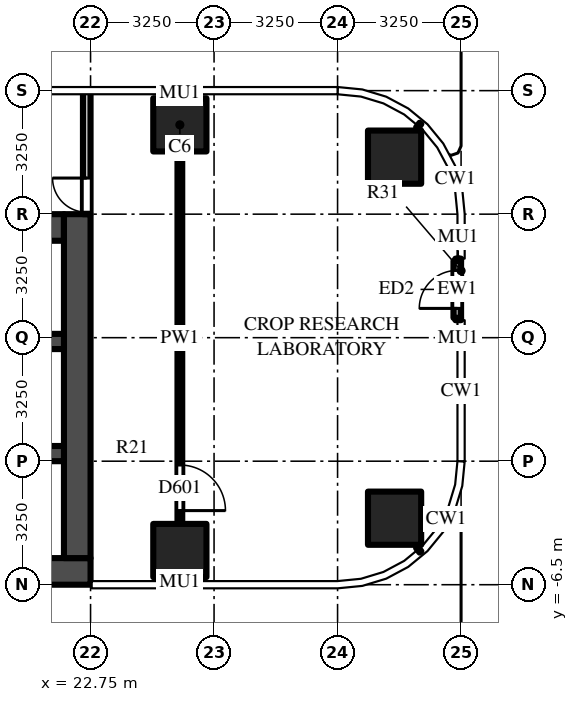
"""IFC4 building model, lengths in metres.
Left out: names, types, materials, properties, quantities, classifications, styles, units other than length and angle.
Written with IfcOpenShell. Run it as: python <this file> out.ifc"""

import sys

from ifc_helpers import new_model, si_unit, direction, frame, frame_2d, origin, origin_2d, place, context, subcontext, project, spatial, rectangle, extrude, source, transform, mapped, element, fill, save


model = new_model("IFC4")
c1 = context("Model", 3, precision=1e-05, world=origin(), true_north=direction((0.0, 1.0)))
c2 = subcontext(c1, "Body", "Model", "MODEL_VIEW")
j1 = project(units=[si_unit("LENGTHUNIT", "METRE"), si_unit("PLANEANGLEUNIT", "RADIAN")], contexts=[c1])
p1 = place(None, origin())
s1 = spatial("IfcSite", under=j1, at=p1, CompositionType="ELEMENT")
p2 = place(p1, origin())
s2 = spatial("IfcBuilding", under=s1, at=p2, CompositionType="ELEMENT")
p3 = place(p2, frame((0.0, 0.0, 34.0)))
s3 = spatial("IfcBuildingStorey", under=s2, at=p3, CompositionType="ELEMENT", Elevation=34.0)
m1 = source(origin(), c2, "Body", "SweptSolid", [
    extrude(rectangle(XDim=1.4, YDim=1.4, at=origin_2d()), origin(), (0.0, 0.0, 1.0), 4.5),
])
for number, where, z_axis, x_axis in (
    (1, (25.1, 5.6, 0.0), (0.0, 0.0, 1.0), (1.0, 0.0, 0.0)),
    (2, (30.75, 4.75, 0.0), (0.0, 0.0, 1.0), (1.0, 0.0, 0.0)),
    (3, (25.1, -5.6, 0.0), (0.0, 0.0, 1.0), (1.0, 0.0, 0.0)),
    (4, (30.75, -4.75, 0.0), (0.0, 0.0, 1.0), (1.0, 0.0, 0.0)),
):
    element("IfcColumn", number, at=place(p3, frame(where, z_axis=z_axis, x_axis=x_axis)), inside=s3, PredefinedType="COLUMN", context=c2, shape_type="MappedRepresentation", body=[
        mapped(m1, transform((0.0, 0.0, 0.0))),
    ])
m2 = source(origin(), c2, "Body", "SweptSolid", [
    extrude(rectangle(XDim=16.45, YDim=0.7, at=frame_2d((8.225, 0.0))), origin(), (0.0, 0.0, 1.0), 4.25),
])
p4 = place(p3, frame((6.3, -6.15, 0.0), z_axis=(0.0, 0.0, 1.0), x_axis=(1.0, 0.0, 0.0)))
e5 = element("IfcWall", 5, at=p4, inside=s3, PredefinedType="SHEAR", context=c2, shape_type="MappedRepresentation", body=[
    mapped(m2, transform((0.0, 0.0, 0.0))),
])
m3 = source(origin(), c2, "Body", "SweptSolid", [
    extrude(rectangle(XDim=14.85, YDim=0.7, at=frame_2d((7.425, 0.0))), origin(), (0.0, 0.0, 1.0), 4.25),
])
p5 = place(p3, frame((7.2, 2.9, 0.0), z_axis=(0.0, 0.0, 1.0), x_axis=(1.0, 0.0, 0.0)))
e6 = element("IfcWall", 6, at=p5, inside=s3, PredefinedType="SHEAR", context=c2, shape_type="MappedRepresentation", body=[
    mapped(m3, transform((0.0, 0.0, 0.0))),
])
m4 = source(origin(), c2, "Body", "SweptSolid", [
    extrude(rectangle(XDim=1.3, YDim=2.1, at=frame_2d((0.65, 1.05))), frame((0.0, 0.36, 0.0), z_axis=(0.0, -1.0, 0.0), x_axis=(1.0, 0.0, 0.0)), (0.0, 0.0, 1.0), 0.72),
])
p6 = place(p5, frame((12.2, 0.0, 0.0)))
e7 = element("IfcOpeningElement", 7, at=p6, cuts=e6, PredefinedType="OPENING", context=c2, shape_type="MappedRepresentation", body=[
    mapped(m4, transform((0.0, 0.0, 0.0))),
])
m5 = source(origin(), c2, "Body", "SweptSolid", [
    extrude(rectangle(XDim=1.2, YDim=2.1, at=frame_2d((0.6, 1.05))), frame((0.0, 0.36, 0.0), z_axis=(0.0, -1.0, 0.0), x_axis=(1.0, 0.0, 0.0)), (0.0, 0.0, 1.0), 0.72),
])
p7 = place(p5, frame((9.85, 0.0, 0.0)))
e8 = element("IfcOpeningElement", 8, at=p7, cuts=e6, PredefinedType="OPENING", context=c2, shape_type="MappedRepresentation", body=[
    mapped(m5, transform((0.0, 0.0, 0.0))),
])
m6 = source(origin(), c2, "Body", "SweptSolid", [
    extrude(rectangle(XDim=1.0, YDim=2.1, at=frame_2d((0.5, 1.05))), frame((0.0, 0.36, 0.0), z_axis=(0.0, -1.0, 0.0), x_axis=(1.0, 0.0, 0.0)), (0.0, 0.0, 1.0), 0.72),
])
p8 = place(p5, frame((7.9, 0.0, 0.0)))
e9 = element("IfcOpeningElement", 9, at=p8, cuts=e6, PredefinedType="OPENING", context=c2, shape_type="MappedRepresentation", body=[
    mapped(m6, transform((0.0, 0.0, 0.0))),
])
m7 = source(origin(), c2, "Body", "SweptSolid", [
    extrude(rectangle(XDim=0.9, YDim=2.1, at=frame_2d((0.45, 1.05))), frame((0.0, 0.36, 0.0), z_axis=(0.0, -1.0, 0.0), x_axis=(1.0, 0.0, 0.0)), (0.0, 0.0, 1.0), 0.72),
])
p9 = place(p5, frame((0.65, 0.0, 0.0)))
e10 = element("IfcOpeningElement", 10, at=p9, cuts=e6, PredefinedType="OPENING", context=c2, shape_type="MappedRepresentation", body=[
    mapped(m7, transform((0.0, 0.0, 0.0))),
])
p10 = place(p5, frame((3.25, 0.0, 0.0)))
e11 = element("IfcOpeningElement", 11, at=p10, cuts=e6, PredefinedType="OPENING", context=c2, shape_type="MappedRepresentation", body=[
    mapped(m7, transform((0.0, 0.0, 0.0))),
])
p11 = place(p5, frame((5.8, 0.0, 0.0)))
e12 = element("IfcOpeningElement", 12, at=p11, cuts=e6, PredefinedType="OPENING", context=c2, shape_type="MappedRepresentation", body=[
    mapped(m6, transform((0.0, 0.0, 0.0))),
])
m8 = source(origin(), c2, "Body", "SweptSolid", [
    extrude(rectangle(XDim=9.05, YDim=0.7, at=frame_2d((4.525, 0.0))), origin(), (0.0, 0.0, 1.0), 4.25),
])
p12 = place(p3, frame((22.4, -5.8, 0.0), z_axis=(0.0, 0.0, 1.0), x_axis=(0.0, 1.0, 0.0)))
e13 = element("IfcWall", 13, at=p12, inside=s3, PredefinedType="SHEAR", context=c2, shape_type="MappedRepresentation", body=[
    mapped(m8, transform((0.0, 0.0, 0.0))),
])
m9 = source(origin(), c2, "Body", "SweptSolid", [
    extrude(rectangle(XDim=14.85, YDim=0.4, at=frame_2d((7.425, 0.0))), origin(), (0.0, 0.0, 1.0), 4.25),
])
p13 = place(p3, frame((7.2, -0.1, 0.0), z_axis=(0.0, 0.0, 1.0), x_axis=(1.0, 0.0, 0.0)))
e14 = element("IfcWall", 14, at=p13, inside=s3, PredefinedType="SHEAR", context=c2, shape_type="MappedRepresentation", body=[
    mapped(m9, transform((0.0, 0.0, 0.0))),
])
m10 = source(origin(), c2, "Body", "SweptSolid", [
    extrude(rectangle(XDim=1.0, YDim=2.1, at=frame_2d((0.5, 1.05))), frame((0.0, 0.21, 0.0), z_axis=(0.0, -1.0, 0.0), x_axis=(1.0, 0.0, 0.0)), (0.0, 0.0, 1.0), 0.42),
])
p14 = place(p13, frame((7.9, 0.0, 0.0)))
e15 = element("IfcOpeningElement", 15, at=p14, cuts=e14, PredefinedType="OPENING", context=c2, shape_type="MappedRepresentation", body=[
    mapped(m10, transform((0.0, 0.0, 0.0))),
])
m11 = source(origin(), c2, "Body", "SweptSolid", [
    extrude(rectangle(XDim=5.7, YDim=0.4, at=frame_2d((2.85, 0.0))), origin(), (0.0, 0.0, 1.0), 4.25),
])
p15 = place(p3, frame((16.35, -3.05, 0.0), z_axis=(0.0, 0.0, 1.0), x_axis=(1.0, 0.0, 0.0)))
e16 = element("IfcWall", 16, at=p15, inside=s3, PredefinedType="SHEAR", context=c2, shape_type="MappedRepresentation", body=[
    mapped(m11, transform((0.0, 0.0, 0.0))),
])
m12 = source(origin(), c2, "Body", "SweptSolid", [
    extrude(rectangle(XDim=3.25, YDim=0.2, at=frame_2d((1.625, 0.0))), origin(), (0.0, 0.0, 1.0), 4.25),
])
p16 = place(p3, frame((22.65, 3.25, 0.0), z_axis=(0.0, 0.0, 1.0), x_axis=(0.0, 1.0, 0.0)))
e17 = element("IfcWall", 17, at=p16, inside=s3, PredefinedType="PARTITIONING", context=c2, shape_type="MappedRepresentation", body=[
    mapped(m12, transform((0.0, 0.0, 0.0))),
])
m13 = source(origin(), c2, "Body", "SweptSolid", [
    extrude(rectangle(XDim=0.9, YDim=2.1, at=frame_2d((0.45, 1.05))), frame((0.0, 0.11, 0.0), z_axis=(0.0, -1.0, 0.0), x_axis=(1.0, 0.0, 0.0)), (0.0, 0.0, 1.0), 0.22),
])
p17 = place(p16, frame((0.05, 0.0, 0.0)))
e18 = element("IfcOpeningElement", 18, at=p17, cuts=e17, PredefinedType="OPENING", context=c2, shape_type="MappedRepresentation", body=[
    mapped(m13, transform((0.0, 0.0, 0.0))),
])
m14 = source(origin(), c2, "Body", "SweptSolid", [
    extrude(rectangle(XDim=1.5, YDim=0.2, at=frame_2d((0.75, 0.0))), origin(), (0.0, 0.0, 1.0), 4.25),
])
p18 = place(p3, frame((32.4, 0.52, 0.0), z_axis=(0.0, 0.0, 1.0), x_axis=(0.0, 1.0, 0.0)))
e19 = element("IfcWall", 19, at=p18, inside=s3, PredefinedType="SOLIDWALL", context=c2, shape_type="MappedRepresentation", body=[
    mapped(m14, transform((0.0, 0.0, 0.0))),
])
m15 = source(origin(), c2, "Body", "SweptSolid", [
    extrude(rectangle(XDim=1.0, YDim=2.4, at=frame_2d((0.5, 1.2))), frame((0.0, 0.11, 0.0), z_axis=(0.0, -1.0, 0.0), x_axis=(1.0, 0.0, 0.0)), (0.0, 0.0, 1.0), 0.22),
])
p19 = place(p18, frame((0.25, 0.0, 0.0)))
e20 = element("IfcOpeningElement", 20, at=p19, cuts=e19, PredefinedType="OPENING", context=c2, shape_type="MappedRepresentation", body=[
    mapped(m15, transform((0.0, 0.0, 0.0))),
])
m16 = source(origin(), c2, "Body", "SweptSolid", [
    extrude(rectangle(XDim=9.8, YDim=0.125, at=frame_2d((4.9, 0.0))), origin(), (0.0, 0.0, 1.0), 3.468),
])
p20 = place(p3, frame((25.1, 4.9, 0.0), z_axis=(0.0, 0.0, 1.0), x_axis=(0.0, -1.0, 0.0)))
e21 = element("IfcWall", 21, at=p20, inside=s3, PredefinedType="PARTITIONING", context=c2, shape_type="MappedRepresentation", body=[
    mapped(m16, transform((0.0, 0.0, 0.0))),
])
m17 = source(origin(), c2, "Body", "SweptSolid", [
    extrude(rectangle(XDim=1.2, YDim=2.1, at=frame_2d((0.6, 1.05))), frame((0.0, 0.073, 0.0), z_axis=(0.0, -1.0, 0.0), x_axis=(1.0, 0.0, 0.0)), (0.0, 0.0, 1.0), 0.145),
])
p21 = place(p20, frame((8.25, 0.0, 0.0)))
e22 = element("IfcOpeningElement", 22, at=p21, cuts=e21, PredefinedType="OPENING", context=c2, shape_type="MappedRepresentation", body=[
    mapped(m17, transform((0.0, 0.0, 0.0))),
])
m18 = source(origin(), c2, "Body", "SweptSolid", [
    extrude(rectangle(XDim=0.9, YDim=2.1, at=frame_2d((0.45, 1.05))), frame((0.0, 0.025, 0.0), z_axis=(0.0, -1.0, 0.0), x_axis=(1.0, 0.0, 0.0)), (0.0, 0.0, 1.0), 0.05),
])
p22 = place(p17, origin())
e23 = element("IfcDoor", 23, at=p22, inside=s3, OperationType="SINGLE_SWING_RIGHT", PredefinedType="DOOR", context=c2, shape_type="MappedRepresentation", body=[
    mapped(m18, transform((0.0, 0.0, 0.0))),
])
fill(e18, e23)
m19 = source(origin(), c2, "Body", "SweptSolid", [
    extrude(rectangle(XDim=1.0, YDim=2.4, at=frame_2d((0.5, 1.2))), frame((0.0, 0.025, 0.0), z_axis=(0.0, -1.0, 0.0), x_axis=(1.0, 0.0, 0.0)), (0.0, 0.0, 1.0), 0.05),
])
p23 = place(p19, origin())
e24 = element("IfcDoor", 24, at=p23, inside=s3, OperationType="SINGLE_SWING_LEFT", PredefinedType="DOOR", context=c2, shape_type="MappedRepresentation", body=[
    mapped(m19, transform((0.0, 0.0, 0.0))),
])
fill(e20, e24)
m20 = source(origin(), c2, "Body", "SweptSolid", [
    extrude(rectangle(XDim=1.2, YDim=2.1, at=frame_2d((0.6, 1.05))), frame((0.0, 0.025, 0.0), z_axis=(0.0, -1.0, 0.0), x_axis=(1.0, 0.0, 0.0)), (0.0, 0.0, 1.0), 0.05),
])
p24 = place(p21, origin())
e25 = element("IfcDoor", 25, at=p24, inside=s3, OperationType="SINGLE_SWING_RIGHT", PredefinedType="DOOR", context=c2, shape_type="MappedRepresentation", body=[
    mapped(m20, transform((0.0, 0.0, 0.0))),
])
fill(e22, e25)
save(model, sys.argv[1])
